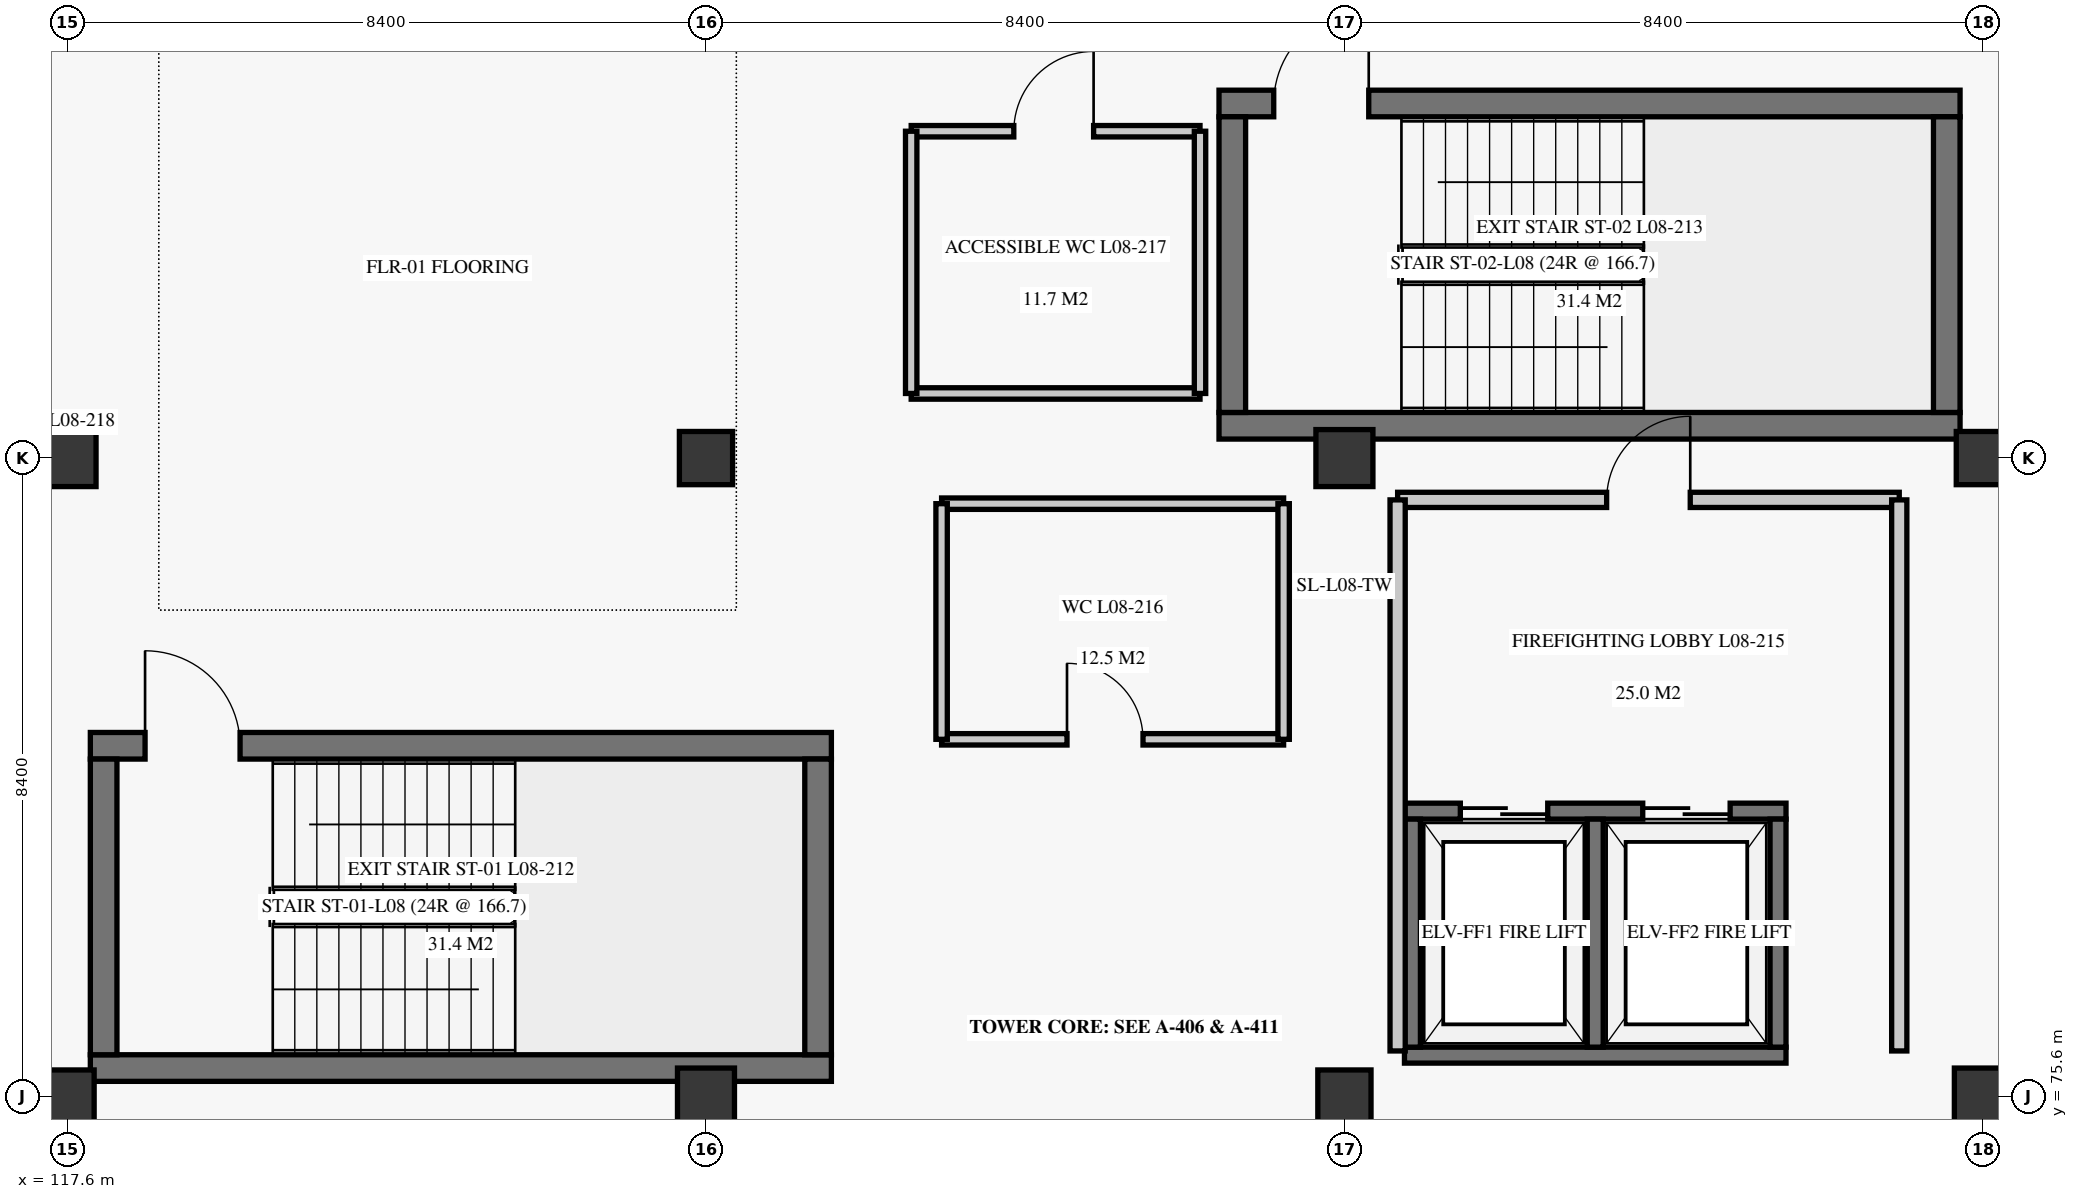
"""IFC4 building model, lengths in metres.
Left out: names, types, materials, properties, quantities, classifications, styles, units other than length and angle.
Written with IfcOpenShell. Run it as: python <this file> out.ifc"""

import sys

from ifc_helpers import new_model, si_unit, direction, frame, frame_2d, origin, origin_2d, place, context, subcontext, project, spatial, rectangle, extrude, element, fill, save


model = new_model("IFC4")
c1 = context("Model", 3, precision=1e-05, world=origin(), true_north=direction((0.0, 1.0)))
c2 = subcontext(c1, "Body", "Model", "MODEL_VIEW")
j1 = project(units=[si_unit("LENGTHUNIT", "METRE"), si_unit("PLANEANGLEUNIT", "RADIAN")], contexts=[c1])
p1 = place(None, origin())
s1 = spatial("IfcSite", under=j1, at=p1, CompositionType="ELEMENT")
p2 = place(p1, origin())
s2 = spatial("IfcBuilding", under=s1, at=p2, CompositionType="ELEMENT")
p3 = place(p2, frame((0.0, 0.0, 34.7)))
s3 = spatial("IfcBuildingStorey", under=s2, at=p3, CompositionType="ELEMENT", Elevation=34.7)
p4 = place(p3, frame((117.6, 75.6, 0.0), z_axis=(0.0, 0.0, 1.0), x_axis=(1.0, 0.0, 0.0)))
e1 = element("IfcColumn", 1, at=p4, inside=s3, PredefinedType="COLUMN", context=c2, shape_type="SweptSolid", body=[
    extrude(rectangle(XDim=0.7, YDim=0.7, at=origin_2d()), origin(), (0.0, 0.0, 1.0), 3.72),
])
for number, where, z_axis, x_axis in (
    (2, (117.6, 84.0, 0.0), (0.0, 0.0, 1.0), (1.0, 0.0, 0.0)),
    (3, (126.0, 75.6, 0.0), (0.0, 0.0, 1.0), (1.0, 0.0, 0.0)),
):
    element("IfcColumn", number, at=place(p3, frame(where, z_axis=z_axis, x_axis=x_axis)), inside=s3, PredefinedType="COLUMN", context=c2, shape_type="SweptSolid", body=[
        extrude(rectangle(XDim=0.75, YDim=0.75, at=origin_2d()), origin(), (0.0, 0.0, 1.0), 3.72),
    ])
for number, where, z_axis, x_axis in (
    (4, (126.0, 84.0, 0.0), (0.0, 0.0, 1.0), (1.0, 0.0, 0.0)),
    (5, (134.4, 75.6, 0.0), (0.0, 0.0, 1.0), (1.0, 0.0, 0.0)),
):
    element("IfcColumn", number, at=place(p3, frame(where, z_axis=z_axis, x_axis=x_axis)), inside=s3, PredefinedType="COLUMN", context=c2, shape_type="SweptSolid", body=[
        extrude(rectangle(XDim=0.7, YDim=0.7, at=origin_2d()), origin(), (0.0, 0.0, 1.0), 3.72),
    ])
for number, where, z_axis, x_axis in (
    (6, (134.4, 84.0, 0.0), (0.0, 0.0, 1.0), (1.0, 0.0, 0.0)),
    (7, (142.8, 75.6, 0.0), (0.0, 0.0, 1.0), (1.0, 0.0, 0.0)),
):
    element("IfcColumn", number, at=place(p3, frame(where, z_axis=z_axis, x_axis=x_axis)), inside=s3, PredefinedType="COLUMN", context=c2, shape_type="SweptSolid", body=[
        extrude(rectangle(XDim=0.75, YDim=0.75, at=origin_2d()), origin(), (0.0, 0.0, 1.0), 3.72),
    ])
p5 = place(p3, frame((142.8, 84.0, 0.0), z_axis=(0.0, 0.0, 1.0), x_axis=(1.0, 0.0, 0.0)))
e8 = element("IfcColumn", 8, at=p5, inside=s3, PredefinedType="COLUMN", context=c2, shape_type="SweptSolid", body=[
    extrude(rectangle(XDim=0.7, YDim=0.7, at=origin_2d()), origin(), (0.0, 0.0, 1.0), 3.72),
])
p6 = place(p3, frame((117.9, 75.975, 0.0), z_axis=(0.0, 0.0, 1.0), x_axis=(1.0, 0.0, 0.0)))
e9 = element("IfcWall", 9, at=p6, inside=s3, PredefinedType="SHEAR", context=c2, shape_type="SweptSolid", body=[
    extrude(rectangle(XDim=9.75, YDim=0.35, at=frame_2d((4.875, 0.0))), origin(), (0.0, 0.0, 1.0), 3.72),
])
p7 = place(p3, frame((117.9, 80.215, 0.0), z_axis=(0.0, 0.0, 1.0), x_axis=(1.0, 0.0, 0.0)))
e10 = element("IfcWall", 10, at=p7, inside=s3, PredefinedType="SHEAR", context=c2, shape_type="SweptSolid", body=[
    extrude(rectangle(XDim=9.75, YDim=0.35, at=frame_2d((4.875, 0.0))), origin(), (0.0, 0.0, 1.0), 3.72),
])
p8 = place(p7, frame((0.72, 0.0, 0.0)))
e11 = element("IfcOpeningElement", 11, at=p8, cuts=e10, PredefinedType="OPENING", context=c2, shape_type="SweptSolid", body=[
    extrude(rectangle(XDim=1.25, YDim=2.2, at=frame_2d((0.625, 1.1))), frame((0.0, 0.185, 0.0), z_axis=(0.0, -1.0, 0.0), x_axis=(1.0, 0.0, 0.0)), (0.0, 0.0, 1.0), 0.37),
])
for number, where, z_axis, x_axis in (
    (12, (118.075, 76.15, 0.0), (0.0, 0.0, 1.0), (0.0, 1.0, 0.0)),
    (13, (127.475, 76.15, 0.0), (0.0, 0.0, 1.0), (0.0, 1.0, 0.0)),
):
    element("IfcWall", number, at=place(p3, frame(where, z_axis=z_axis, x_axis=x_axis)), inside=s3, PredefinedType="SHEAR", context=c2, shape_type="SweptSolid", body=[
        extrude(rectangle(XDim=3.89, YDim=0.35, at=frame_2d((1.945, 0.0))), origin(), (0.0, 0.0, 1.0), 3.72),
    ])
p9 = place(p3, frame((132.75, 84.425, 0.0), z_axis=(0.0, 0.0, 1.0), x_axis=(1.0, 0.0, 0.0)))
e14 = element("IfcWall", 14, at=p9, inside=s3, PredefinedType="SHEAR", context=c2, shape_type="SweptSolid", body=[
    extrude(rectangle(XDim=9.75, YDim=0.35, at=frame_2d((4.875, 0.0))), origin(), (0.0, 0.0, 1.0), 3.72),
])
p10 = place(p3, frame((132.75, 88.665, 0.0), z_axis=(0.0, 0.0, 1.0), x_axis=(1.0, 0.0, 0.0)))
e15 = element("IfcWall", 15, at=p10, inside=s3, PredefinedType="SHEAR", context=c2, shape_type="SweptSolid", body=[
    extrude(rectangle(XDim=9.75, YDim=0.35, at=frame_2d((4.875, 0.0))), origin(), (0.0, 0.0, 1.0), 3.72),
])
p11 = place(p10, frame((0.72, 0.0, 0.0)))
e16 = element("IfcOpeningElement", 16, at=p11, cuts=e15, PredefinedType="OPENING", context=c2, shape_type="SweptSolid", body=[
    extrude(rectangle(XDim=1.25, YDim=2.2, at=frame_2d((0.625, 1.1))), frame((0.0, 0.185, 0.0), z_axis=(0.0, -1.0, 0.0), x_axis=(1.0, 0.0, 0.0)), (0.0, 0.0, 1.0), 0.37),
])
for number, where, z_axis, x_axis in (
    (17, (132.925, 84.6, 0.0), (0.0, 0.0, 1.0), (0.0, 1.0, 0.0)),
    (18, (142.325, 84.6, 0.0), (0.0, 0.0, 1.0), (0.0, 1.0, 0.0)),
):
    element("IfcWall", number, at=place(p3, frame(where, z_axis=z_axis, x_axis=x_axis)), inside=s3, PredefinedType="SHEAR", context=c2, shape_type="SweptSolid", body=[
        extrude(rectangle(XDim=3.89, YDim=0.35, at=frame_2d((1.945, 0.0))), origin(), (0.0, 0.0, 1.0), 3.72),
    ])
p12 = place(p3, frame((135.19, 76.145, 0.0), z_axis=(0.0, 0.0, 1.0), x_axis=(1.0, 0.0, 0.0)))
e19 = element("IfcWall", 19, at=p12, inside=s3, PredefinedType="SHEAR", context=c2, shape_type="SweptSolid", body=[
    extrude(rectangle(XDim=5.02, YDim=0.21, at=frame_2d((2.51, 0.0))), origin(), (0.0, 0.0, 1.0), 3.72),
])
p13 = place(p3, frame((135.19, 79.355, 0.0), z_axis=(0.0, 0.0, 1.0), x_axis=(1.0, 0.0, 0.0)))
e20 = element("IfcWall", 20, at=p13, inside=s3, PredefinedType="SHEAR", context=c2, shape_type="SweptSolid", body=[
    extrude(rectangle(XDim=5.02, YDim=0.21, at=frame_2d((2.51, 0.0))), origin(), (0.0, 0.0, 1.0), 3.72),
])
p14 = place(p13, frame((0.735, 0.0, 0.0)))
e21 = element("IfcOpeningElement", 21, at=p14, cuts=e20, PredefinedType="OPENING", context=c2, shape_type="SweptSolid", body=[
    extrude(rectangle(XDim=1.15, YDim=2.2, at=frame_2d((0.575, 1.1))), frame((0.0, 0.115, 0.0), z_axis=(0.0, -1.0, 0.0), x_axis=(1.0, 0.0, 0.0)), (0.0, 0.0, 1.0), 0.23),
])
p15 = place(p13, frame((3.135, 0.0, 0.0)))
e22 = element("IfcOpeningElement", 22, at=p15, cuts=e20, PredefinedType="OPENING", context=c2, shape_type="SweptSolid", body=[
    extrude(rectangle(XDim=1.15, YDim=2.2, at=frame_2d((0.575, 1.1))), frame((0.0, 0.115, 0.0), z_axis=(0.0, -1.0, 0.0), x_axis=(1.0, 0.0, 0.0)), (0.0, 0.0, 1.0), 0.23),
])
for number, where, z_axis, x_axis in (
    (23, (135.295, 76.25, 0.0), (0.0, 0.0, 1.0), (0.0, 1.0, 0.0)),
    (24, (140.105, 76.25, 0.0), (0.0, 0.0, 1.0), (0.0, 1.0, 0.0)),
    (25, (137.7, 76.25, 0.0), (0.0, 0.0, 1.0), (0.0, 1.0, 0.0)),
):
    element("IfcWall", number, at=place(p3, frame(where, z_axis=z_axis, x_axis=x_axis)), inside=s3, PredefinedType="SHEAR", context=c2, shape_type="SweptSolid", body=[
        extrude(rectangle(XDim=3.0, YDim=0.21, at=frame_2d((1.5, 0.0))), origin(), (0.0, 0.0, 1.0), 3.72),
    ])
p16 = place(p3, frame((135.1, 83.45, 0.0), z_axis=(0.0, 0.0, 1.0), x_axis=(1.0, 0.0, 0.0)))
e26 = element("IfcWall", 26, at=p16, inside=s3, PredefinedType="PARTITIONING", context=c2, shape_type="SweptSolid", body=[
    extrude(rectangle(XDim=6.6, YDim=0.2, at=frame_2d((3.3, 0.0))), origin(), (0.0, 0.0, 1.0), 3.34),
])
p17 = place(p16, frame((2.75, 0.0, 0.0)))
e27 = element("IfcOpeningElement", 27, at=p17, cuts=e26, PredefinedType="OPENING", context=c2, shape_type="SweptSolid", body=[
    extrude(rectangle(XDim=1.1, YDim=2.2, at=frame_2d((0.55, 1.1))), frame((0.0, 0.11, 0.0), z_axis=(0.0, -1.0, 0.0), x_axis=(1.0, 0.0, 0.0)), (0.0, 0.0, 1.0), 0.22),
])
for number, where, z_axis, x_axis in (
    (28, (135.1, 76.2, 0.0), (0.0, 0.0, 1.0), (0.0, 1.0, 0.0)),
    (29, (141.7, 76.2, 0.0), (0.0, 0.0, 1.0), (0.0, 1.0, 0.0)),
):
    element("IfcWall", number, at=place(p3, frame(where, z_axis=z_axis, x_axis=x_axis)), inside=s3, PredefinedType="PARTITIONING", context=c2, shape_type="SweptSolid", body=[
        extrude(rectangle(XDim=7.25, YDim=0.2, at=frame_2d((3.625, 0.0))), origin(), (0.0, 0.0, 1.0), 3.34),
    ])
p18 = place(p3, frame((129.1, 80.3, 0.0), z_axis=(0.0, 0.0, 1.0), x_axis=(1.0, 0.0, 0.0)))
e30 = element("IfcWall", 30, at=p18, inside=s3, PredefinedType="PARTITIONING", context=c2, shape_type="SweptSolid", body=[
    extrude(rectangle(XDim=4.5, YDim=0.15, at=frame_2d((2.25, 0.0))), origin(), (0.0, 0.0, 1.0), 3.34),
])
p19 = place(p18, frame((1.65, 0.0, 0.0)))
e31 = element("IfcOpeningElement", 31, at=p19, cuts=e30, PredefinedType="OPENING", context=c2, shape_type="SweptSolid", body=[
    extrude(rectangle(XDim=1.0, YDim=2.1, at=frame_2d((0.5, 1.05))), frame((0.0, 0.085, 0.0), z_axis=(0.0, -1.0, 0.0), x_axis=(1.0, 0.0, 0.0)), (0.0, 0.0, 1.0), 0.17),
])
p20 = place(p3, frame((129.1, 83.4, 0.0), z_axis=(0.0, 0.0, 1.0), x_axis=(1.0, 0.0, 0.0)))
e32 = element("IfcWall", 32, at=p20, inside=s3, PredefinedType="PARTITIONING", context=c2, shape_type="SweptSolid", body=[
    extrude(rectangle(XDim=4.5, YDim=0.15, at=frame_2d((2.25, 0.0))), origin(), (0.0, 0.0, 1.0), 3.34),
])
for number, where, z_axis, x_axis in (
    (33, (129.1, 80.3, 0.0), (0.0, 0.0, 1.0), (0.0, 1.0, 0.0)),
    (34, (133.6, 80.3, 0.0), (0.0, 0.0, 1.0), (0.0, 1.0, 0.0)),
):
    element("IfcWall", number, at=place(p3, frame(where, z_axis=z_axis, x_axis=x_axis)), inside=s3, PredefinedType="PARTITIONING", context=c2, shape_type="SweptSolid", body=[
        extrude(rectangle(XDim=3.1, YDim=0.15, at=frame_2d((1.55, 0.0))), origin(), (0.0, 0.0, 1.0), 3.34),
    ])
p21 = place(p3, frame((128.7, 88.3, 0.0), z_axis=(0.0, 0.0, 1.0), x_axis=(1.0, 0.0, 0.0)))
e35 = element("IfcWall", 35, at=p21, inside=s3, PredefinedType="PARTITIONING", context=c2, shape_type="SweptSolid", body=[
    extrude(rectangle(XDim=3.8, YDim=0.15, at=frame_2d((1.9, 0.0))), origin(), (0.0, 0.0, 1.0), 3.34),
])
p22 = place(p21, frame((1.35, 0.0, 0.0)))
e36 = element("IfcOpeningElement", 36, at=p22, cuts=e35, PredefinedType="OPENING", context=c2, shape_type="SweptSolid", body=[
    extrude(rectangle(XDim=1.05, YDim=2.15, at=frame_2d((0.525, 1.075))), frame((0.0, 0.085, 0.0), z_axis=(0.0, -1.0, 0.0), x_axis=(1.0, 0.0, 0.0)), (0.0, 0.0, 1.0), 0.17),
])
p23 = place(p3, frame((128.7, 84.85, 0.0), z_axis=(0.0, 0.0, 1.0), x_axis=(1.0, 0.0, 0.0)))
e37 = element("IfcWall", 37, at=p23, inside=s3, PredefinedType="PARTITIONING", context=c2, shape_type="SweptSolid", body=[
    extrude(rectangle(XDim=3.8, YDim=0.15, at=frame_2d((1.9, 0.0))), origin(), (0.0, 0.0, 1.0), 3.34),
])
for number, where, z_axis, x_axis in (
    (38, (128.7, 84.85, 0.0), (0.0, 0.0, 1.0), (0.0, 1.0, 0.0)),
    (39, (132.5, 84.85, 0.0), (0.0, 0.0, 1.0), (0.0, 1.0, 0.0)),
):
    element("IfcWall", number, at=place(p3, frame(where, z_axis=z_axis, x_axis=x_axis)), inside=s3, PredefinedType="PARTITIONING", context=c2, shape_type="SweptSolid", body=[
        extrude(rectangle(XDim=3.45, YDim=0.15, at=frame_2d((1.725, 0.0))), origin(), (0.0, 0.0, 1.0), 3.34),
    ])
p24 = place(p8, origin())
e40 = element("IfcDoor", 40, at=p24, inside=s3, OperationType="SINGLE_SWING_LEFT", PredefinedType="DOOR", context=c2, shape_type="SweptSolid", body=[
    extrude(rectangle(XDim=1.25, YDim=2.2, at=frame_2d((0.625, 1.1))), frame((0.0, 0.025, 0.0), z_axis=(0.0, -1.0, 0.0), x_axis=(1.0, 0.0, 0.0)), (0.0, 0.0, 1.0), 0.05),
])
fill(e11, e40)
p25 = place(p11, origin())
e41 = element("IfcDoor", 41, at=p25, inside=s3, OperationType="SINGLE_SWING_RIGHT", PredefinedType="DOOR", context=c2, shape_type="SweptSolid", body=[
    extrude(rectangle(XDim=1.25, YDim=2.2, at=frame_2d((0.625, 1.1))), frame((0.0, 0.025, 0.0), z_axis=(0.0, -1.0, 0.0), x_axis=(1.0, 0.0, 0.0)), (0.0, 0.0, 1.0), 0.05),
])
fill(e16, e41)
p26 = place(p14, origin())
e42 = element("IfcDoor", 42, at=p26, inside=s3, OperationType="DOUBLE_DOOR_SLIDING", PredefinedType="DOOR", context=c2, shape_type="SweptSolid", body=[
    extrude(rectangle(XDim=1.15, YDim=2.2, at=frame_2d((0.575, 1.1))), frame((0.0, 0.025, 0.0), z_axis=(0.0, -1.0, 0.0), x_axis=(1.0, 0.0, 0.0)), (0.0, 0.0, 1.0), 0.05),
])
fill(e21, e42)
p27 = place(p15, origin())
e43 = element("IfcDoor", 43, at=p27, inside=s3, OperationType="DOUBLE_DOOR_SLIDING", PredefinedType="DOOR", context=c2, shape_type="SweptSolid", body=[
    extrude(rectangle(XDim=1.15, YDim=2.2, at=frame_2d((0.575, 1.1))), frame((0.0, 0.025, 0.0), z_axis=(0.0, -1.0, 0.0), x_axis=(1.0, 0.0, 0.0)), (0.0, 0.0, 1.0), 0.05),
])
fill(e22, e43)
p28 = place(p17, origin())
e44 = element("IfcDoor", 44, at=p28, inside=s3, OperationType="SINGLE_SWING_RIGHT", PredefinedType="DOOR", context=c2, shape_type="SweptSolid", body=[
    extrude(rectangle(XDim=1.1, YDim=2.2, at=frame_2d((0.55, 1.1))), frame((0.0, 0.025, 0.0), z_axis=(0.0, -1.0, 0.0), x_axis=(1.0, 0.0, 0.0)), (0.0, 0.0, 1.0), 0.05),
])
fill(e27, e44)
p29 = place(p19, origin())
e45 = element("IfcDoor", 45, at=p29, inside=s3, OperationType="SINGLE_SWING_LEFT", PredefinedType="DOOR", context=c2, shape_type="SweptSolid", body=[
    extrude(rectangle(XDim=1.0, YDim=2.1, at=frame_2d((0.5, 1.05))), frame((0.0, 0.025, 0.0), z_axis=(0.0, -1.0, 0.0), x_axis=(1.0, 0.0, 0.0)), (0.0, 0.0, 1.0), 0.05),
])
fill(e31, e45)
p30 = place(p22, origin())
e46 = element("IfcDoor", 46, at=p30, inside=s3, OperationType="SINGLE_SWING_RIGHT", PredefinedType="DOOR", context=c2, shape_type="SweptSolid", body=[
    extrude(rectangle(XDim=1.05, YDim=2.15, at=frame_2d((0.525, 1.075))), frame((0.0, 0.025, 0.0), z_axis=(0.0, -1.0, 0.0), x_axis=(1.0, 0.0, 0.0)), (0.0, 0.0, 1.0), 0.05),
])
fill(e36, e46)
save(model, sys.argv[1])
